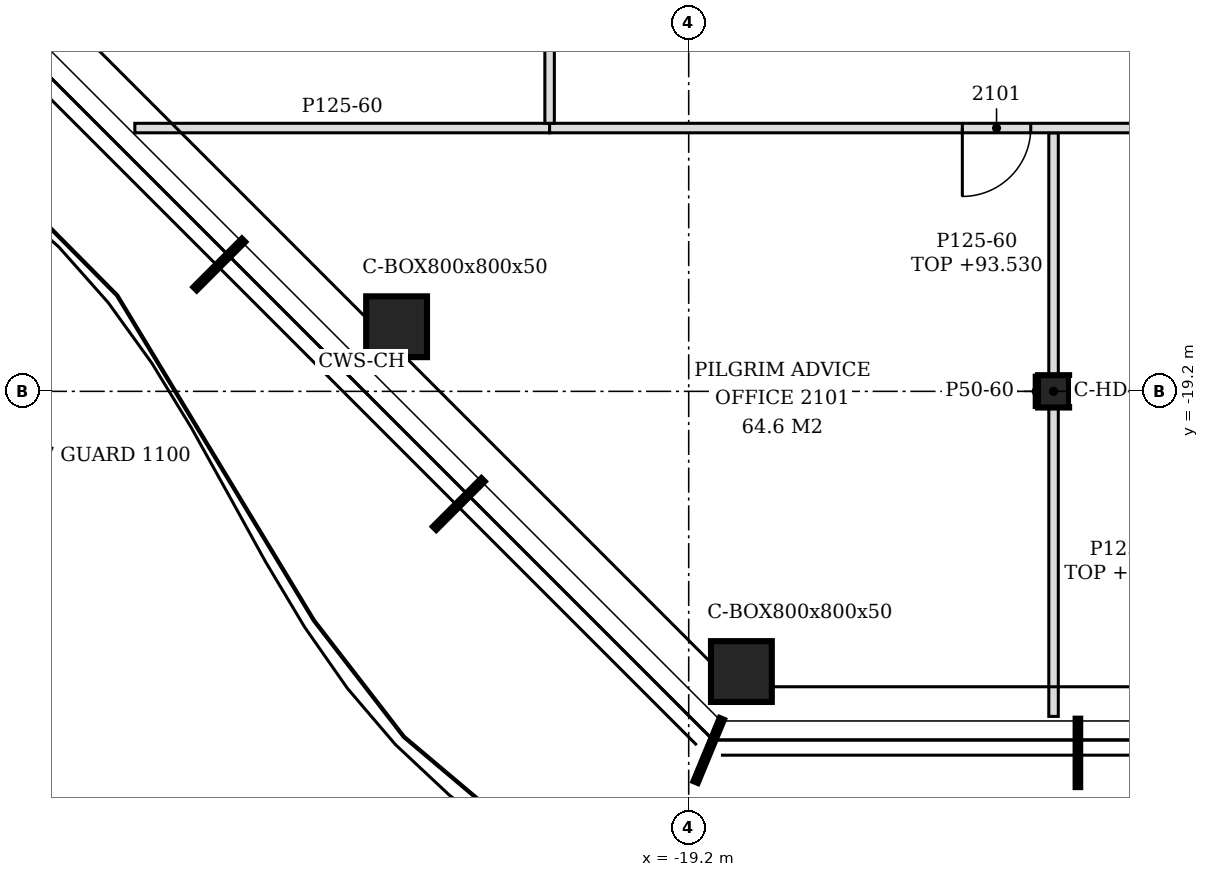
"""IFC4 building model, lengths in metres.
Left out: names, types, materials, properties, quantities, classifications, styles, units other than length and angle.
Written with IfcOpenShell. Run it as: python <this file> out.ifc"""

import sys

from ifc_helpers import new_model, si_unit, direction, frame, frame_2d, origin, origin_2d, place, context, subcontext, project, spatial, polyline, rectangle, hollow_rectangle, i_section, outline, extrude, clip, halfspace, element, fill, save


model = new_model("IFC4")
c1 = context("Model", 3, precision=1e-05, world=origin(), true_north=direction((0.0, 1.0)))
c2 = subcontext(c1, "Body", "Model", "MODEL_VIEW")
j1 = project(units=[si_unit("LENGTHUNIT", "METRE"), si_unit("PLANEANGLEUNIT", "RADIAN")], contexts=[c1])
p1 = place(None, origin())
s1 = spatial("IfcSite", under=j1, at=p1, CompositionType="ELEMENT")
p2 = place(p1, origin())
s2 = spatial("IfcBuilding", under=s1, at=p2, CompositionType="ELEMENT")
p3 = place(p2, frame((0.0, 0.0, 90.6)))
s3 = spatial("IfcBuildingStorey", under=s2, at=p3, CompositionType="ELEMENT", Elevation=90.6)
p4 = place(p3, frame((-18.507, -22.886, -0.15), z_axis=(0.186190455954, 0.124126970636, 0.974641272096), x_axis=(-0.554700196225, 0.832050294338, 0.0)))
e1 = element("IfcColumn", 1, at=p4, inside=s3, PredefinedType="COLUMN", context=c2, shape_type="Clipping", body=[
    clip(clip(extrude(hollow_rectangle(XDim=0.8, YDim=0.8, WallThickness=0.05, at=origin_2d()), origin(), (0.0, 0.0, 1.0), 3.694), halfspace(frame((0.0, 0.0, 0.024), z_axis=(0.0, 0.0, 1.0), x_axis=(1.0, 0.0, 0.0)), True)), halfspace(frame((0.0, 0.0, 3.67), z_axis=(0.0, 0.0, 1.0), x_axis=(1.0, 0.0, 0.0)), False)),
])
p5 = place(p3, frame((-23.043, -18.35, -0.15), z_axis=(0.186254258756, 0.124125442847, 0.974629275947), x_axis=(-0.554563898811, 0.832141143157, 0.0)))
e2 = element("IfcColumn", 2, at=p5, inside=s3, PredefinedType="COLUMN", context=c2, shape_type="Clipping", body=[
    clip(clip(extrude(hollow_rectangle(XDim=0.8, YDim=0.8, WallThickness=0.05, at=origin_2d()), origin(), (0.0, 0.0, 1.0), 3.694), halfspace(frame((0.0, 0.0, 0.024), z_axis=(0.0, 0.0, 1.0), x_axis=(1.0, 0.0, 0.0)), True)), halfspace(frame((0.0, 0.0, 3.67), z_axis=(0.0, 0.0, 1.0), x_axis=(1.0, 0.0, 0.0)), False)),
])
p6 = place(p3, frame((-14.4, -19.2, -0.15), z_axis=(0.0, 0.0, 1.0), x_axis=(1.0, 0.0, 0.0)))
e3 = element("IfcColumn", 3, at=p6, inside=s3, PredefinedType="COLUMN", context=c2, shape_type="SweptSolid", body=[
    extrude(i_section(OverallWidth=0.409, OverallDepth=0.425, WebThickness=0.033, FlangeThickness=0.052, FilletRadius=0.015, at=origin_2d()), origin(), (0.0, 0.0, 1.0), 3.6),
])
p7 = place(p3, frame((-14.4, -23.476, 0.0), z_axis=(0.0, 0.0, 1.0), x_axis=(0.0, 1.0, 0.0)))
e4 = element("IfcWall", 4, at=p7, inside=s3, PredefinedType="PARTITIONING", context=c2, shape_type="SweptSolid", body=[
    extrude(outline(polyline([(0.0, 0.0), (4.064, 0.0), (4.064, 3.03), (1.198, 3.03), (1.197, 2.93), (0.899, 2.93), (0.896, 3.03), (0.0, 3.03), (0.0, 0.0)])), frame((0.0, 0.062, 0.0), z_axis=(0.0, -1.0, 0.0), x_axis=(1.0, 0.0, 0.0)), (0.0, 0.0, 1.0), 0.125),
])
p8 = place(p3, frame((-14.4, -18.988, 0.0), z_axis=(0.0, 0.0, 1.0), x_axis=(0.0, 1.0, 0.0)))
e5 = element("IfcWall", 5, at=p8, inside=s3, PredefinedType="PARTITIONING", context=c2, shape_type="SweptSolid", body=[
    extrude(rectangle(XDim=3.189, YDim=0.125, at=frame_2d((1.594, 0.0))), origin(), (0.0, 0.0, 1.0), 2.93),
])
p9 = place(p3, frame((-26.487, -15.736, 0.0), z_axis=(0.0, 0.0, 1.0), x_axis=(1.0, 0.0, 0.0)))
e6 = element("IfcWall", 6, at=p9, inside=s3, PredefinedType="PARTITIONING", context=c2, shape_type="SweptSolid", body=[
    extrude(outline(polyline([(0.0, 0.0), (5.457, 0.0), (5.457, 3.45), (2.251, 3.45), (2.249, 2.93), (1.702, 2.93), (1.7, 3.45), (0.0, 3.45), (0.0, 0.0)])), frame((0.0, 0.062, 0.0), z_axis=(0.0, -1.0, 0.0), x_axis=(1.0, 0.0, 0.0)), (0.0, 0.0, 1.0), 0.125),
])
p10 = place(p3, frame((-21.03, -15.736, 0.0), z_axis=(0.0, 0.0, 1.0), x_axis=(1.0, 0.0, 0.0)))
e7 = element("IfcWall", 7, at=p10, inside=s3, PredefinedType="PARTITIONING", context=c2, shape_type="SweptSolid", body=[
    extrude(outline(polyline([(0.0, 0.0), (40.167, 0.0), (40.167, 2.73), (40.08, 2.73), (40.078, 3.45), (28.38, 3.45), (28.378, 2.73), (28.08, 2.73), (28.078, 3.45), (16.38, 3.45), (16.378, 2.73), (16.08, 2.73), (16.078, 3.45), (6.78, 3.45), (6.778, 2.93), (6.48, 2.93), (6.478, 3.45), (0.0, 3.45), (0.0, 0.0)])), frame((0.0, 0.062, 0.0), z_axis=(0.0, -1.0, 0.0), x_axis=(1.0, 0.0, 0.0)), (0.0, 0.0, 1.0), 0.125),
])
p11 = place(p10, frame((5.43, 0.0, 0.0)))
e8 = element("IfcOpeningElement", 8, at=p11, cuts=e7, PredefinedType="OPENING", context=c2, shape_type="SweptSolid", body=[
    extrude(rectangle(XDim=0.9, YDim=2.1, at=frame_2d((0.45, 1.05))), frame((0.0, 0.073, 0.0), z_axis=(0.0, -1.0, 0.0), x_axis=(1.0, 0.0, 0.0)), (0.0, 0.0, 1.0), 0.145),
])
p12 = place(p10, frame((8.681, 0.0, 0.0)))
e9 = element("IfcOpeningElement", 9, at=p12, cuts=e7, PredefinedType="OPENING", context=c2, shape_type="SweptSolid", body=[
    extrude(rectangle(XDim=0.9, YDim=2.1, at=frame_2d((0.45, 1.05))), frame((0.0, 0.073, 0.0), z_axis=(0.0, -1.0, 0.0), x_axis=(1.0, 0.0, 0.0)), (0.0, 0.0, 1.0), 0.145),
])
p13 = place(p10, frame((15.35, 0.0, 0.0)))
e10 = element("IfcOpeningElement", 10, at=p13, cuts=e7, PredefinedType="OPENING", context=c2, shape_type="SweptSolid", body=[
    extrude(rectangle(XDim=0.9, YDim=2.1, at=frame_2d((0.45, 1.05))), frame((0.0, 0.073, 0.0), z_axis=(0.0, -1.0, 0.0), x_axis=(1.0, 0.0, 0.0)), (0.0, 0.0, 1.0), 0.145),
])
p14 = place(p10, frame((18.094, 0.0, 0.0)))
e11 = element("IfcOpeningElement", 11, at=p14, cuts=e7, PredefinedType="OPENING", context=c2, shape_type="SweptSolid", body=[
    extrude(rectangle(XDim=0.9, YDim=2.1, at=frame_2d((0.45, 1.05))), frame((0.0, 0.073, 0.0), z_axis=(0.0, -1.0, 0.0), x_axis=(1.0, 0.0, 0.0)), (0.0, 0.0, 1.0), 0.145),
])
p15 = place(p10, frame((24.95, 0.0, 0.0)))
e12 = element("IfcOpeningElement", 12, at=p15, cuts=e7, PredefinedType="OPENING", context=c2, shape_type="SweptSolid", body=[
    extrude(rectangle(XDim=0.9, YDim=2.1, at=frame_2d((0.45, 1.05))), frame((0.0, 0.073, 0.0), z_axis=(0.0, -1.0, 0.0), x_axis=(1.0, 0.0, 0.0)), (0.0, 0.0, 1.0), 0.145),
])
p16 = place(p10, frame((29.908, 0.0, 0.0)))
e13 = element("IfcOpeningElement", 13, at=p16, cuts=e7, PredefinedType="OPENING", context=c2, shape_type="SweptSolid", body=[
    extrude(rectangle(XDim=0.9, YDim=2.1, at=frame_2d((0.45, 1.05))), frame((0.0, 0.073, 0.0), z_axis=(0.0, -1.0, 0.0), x_axis=(1.0, 0.0, 0.0)), (0.0, 0.0, 1.0), 0.145),
])
p17 = place(p10, frame((31.45, 0.0, 0.0)))
e14 = element("IfcOpeningElement", 14, at=p17, cuts=e7, PredefinedType="OPENING", context=c2, shape_type="SweptSolid", body=[
    extrude(rectangle(XDim=0.9, YDim=2.1, at=frame_2d((0.45, 1.05))), frame((0.0, 0.073, 0.0), z_axis=(0.0, -1.0, 0.0), x_axis=(1.0, 0.0, 0.0)), (0.0, 0.0, 1.0), 0.145),
])
p18 = place(p10, frame((38.23, 0.0, 0.0)))
e15 = element("IfcOpeningElement", 15, at=p18, cuts=e7, PredefinedType="OPENING", context=c2, shape_type="SweptSolid", body=[
    extrude(rectangle(XDim=0.9, YDim=2.1, at=frame_2d((0.45, 1.05))), frame((0.0, 0.073, 0.0), z_axis=(0.0, -1.0, 0.0), x_axis=(1.0, 0.0, 0.0)), (0.0, 0.0, 1.0), 0.145),
])
p19 = place(p3, frame((-21.03, -15.674, 0.0), z_axis=(0.0, 0.0, 1.0), x_axis=(0.0, 1.0, 0.0)))
e16 = element("IfcWall", 16, at=p19, inside=s3, PredefinedType="PARTITIONING", context=c2, shape_type="SweptSolid", body=[
    extrude(outline(polyline([(0.0, 0.0), (37.275, 0.0), (37.275, 3.45), (36.792, 3.45), (36.79, 2.63), (35.677, 2.63), (35.675, 3.45), (35.641, 3.45), (35.639, 2.98), (35.451, 2.98), (35.449, 3.45), (30.851, 3.45), (30.849, 2.88), (30.641, 2.88), (30.639, 3.45), (26.051, 3.45), (26.049, 2.88), (25.841, 2.88), (25.839, 3.45), (21.251, 3.45), (21.249, 2.88), (21.041, 2.88), (21.039, 3.45), (16.451, 3.45), (16.449, 2.88), (16.241, 2.88), (16.239, 3.45), (11.651, 3.45), (11.649, 2.88), (11.441, 2.88), (11.439, 3.45), (6.851, 3.45), (6.849, 2.88), (6.641, 2.88), (6.639, 3.45), (2.051, 3.45), (2.049, 2.88), (1.841, 2.88), (1.839, 3.45), (0.0, 3.45), (0.0, 0.0)])), frame((0.0, 0.062, 0.0), z_axis=(0.0, -1.0, 0.0), x_axis=(1.0, 0.0, 0.0)), (0.0, 0.0, 1.0), 0.125),
])
p20 = place(p19, frame((10.238, 0.0, 0.0)))
e17 = element("IfcOpeningElement", 17, at=p20, cuts=e16, PredefinedType="OPENING", context=c2, shape_type="SweptSolid", body=[
    extrude(rectangle(XDim=0.9, YDim=2.1, at=frame_2d((0.45, 1.05))), frame((0.0, 0.073, 0.0), z_axis=(0.0, -1.0, 0.0), x_axis=(1.0, 0.0, 0.0)), (0.0, 0.0, 1.0), 0.145),
])
p21 = place(p19, frame((11.74, 0.0, 0.0)))
e18 = element("IfcOpeningElement", 18, at=p21, cuts=e16, PredefinedType="OPENING", context=c2, shape_type="SweptSolid", body=[
    extrude(rectangle(XDim=0.9, YDim=2.1, at=frame_2d((0.45, 1.05))), frame((0.0, 0.073, 0.0), z_axis=(0.0, -1.0, 0.0), x_axis=(1.0, 0.0, 0.0)), (0.0, 0.0, 1.0), 0.145),
])
p22 = place(p19, frame((18.773, 0.0, 0.0)))
e19 = element("IfcOpeningElement", 19, at=p22, cuts=e16, PredefinedType="OPENING", context=c2, shape_type="SweptSolid", body=[
    extrude(rectangle(XDim=0.9, YDim=2.1, at=frame_2d((0.45, 1.05))), frame((0.0, 0.073, 0.0), z_axis=(0.0, -1.0, 0.0), x_axis=(1.0, 0.0, 0.0)), (0.0, 0.0, 1.0), 0.145),
])
p23 = place(p19, frame((21.093, 0.0, 0.0)))
e20 = element("IfcOpeningElement", 20, at=p23, cuts=e16, PredefinedType="OPENING", context=c2, shape_type="SweptSolid", body=[
    extrude(rectangle(XDim=0.9, YDim=2.1, at=frame_2d((0.45, 1.05))), frame((0.0, 0.073, 0.0), z_axis=(0.0, -1.0, 0.0), x_axis=(1.0, 0.0, 0.0)), (0.0, 0.0, 1.0), 0.145),
])
p24 = place(p19, frame((26.773, 0.0, 0.0)))
e21 = element("IfcOpeningElement", 21, at=p24, cuts=e16, PredefinedType="OPENING", context=c2, shape_type="SweptSolid", body=[
    extrude(rectangle(XDim=0.9, YDim=2.1, at=frame_2d((0.45, 1.05))), frame((0.0, 0.073, 0.0), z_axis=(0.0, -1.0, 0.0), x_axis=(1.0, 0.0, 0.0)), (0.0, 0.0, 1.0), 0.145),
])
p25 = place(p19, frame((30.444, 0.0, 0.0)))
e22 = element("IfcOpeningElement", 22, at=p25, cuts=e16, PredefinedType="OPENING", context=c2, shape_type="SweptSolid", body=[
    extrude(rectangle(XDim=0.9, YDim=2.1, at=frame_2d((0.45, 1.05))), frame((0.0, 0.073, 0.0), z_axis=(0.0, -1.0, 0.0), x_axis=(1.0, 0.0, 0.0)), (0.0, 0.0, 1.0), 0.145),
])
p26 = place(p3, frame((-14.629, -19.413, 0.0), z_axis=(0.0, 0.0, 1.0), x_axis=(0.0, 1.0, 0.0)))
e23 = element("IfcWall", 23, at=p26, inside=s3, PredefinedType="PARTITIONING", context=c2, shape_type="SweptSolid", body=[
    extrude(rectangle(XDim=0.425, YDim=0.05, at=frame_2d((0.212, 0.0))), origin(), (0.0, 0.0, 1.0), 3.45),
])
p27 = place(p11, frame((0.9, 0.0, 0.0), z_axis=(0.0, 0.0, 1.0), x_axis=(-1.0, 0.0, 0.0)))
e24 = element("IfcDoor", 24, at=p27, inside=s3, OperationType="SINGLE_SWING_RIGHT", PredefinedType="DOOR", context=c2, shape_type="SweptSolid", body=[
    extrude(rectangle(XDim=0.9, YDim=2.1, at=frame_2d((0.45, 1.05))), frame((0.0, 0.025, 0.0), z_axis=(0.0, -1.0, 0.0), x_axis=(1.0, 0.0, 0.0)), (0.0, 0.0, 1.0), 0.05),
])
fill(e8, e24)
save(model, sys.argv[1])
